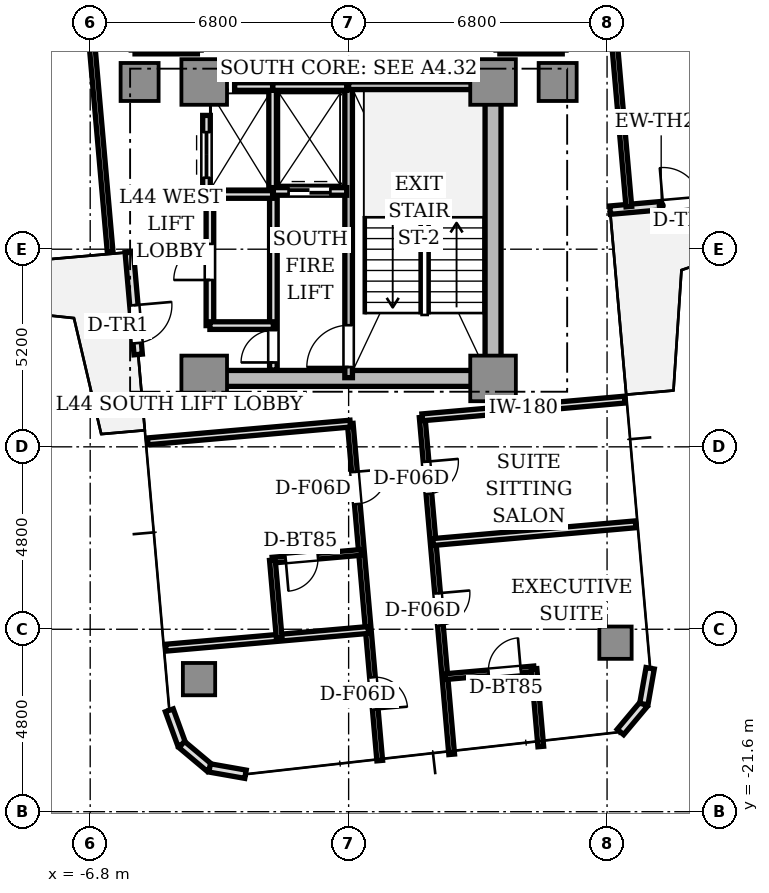
"""IFC4 building model, lengths in metres.
Left out: names, types, materials, properties, quantities, classifications, styles, units other than length and angle.
Written with IfcOpenShell. Run it as: python <this file> out.ifc"""

import sys

from ifc_helpers import new_model, si_unit, direction, frame, frame_2d, origin, origin_2d, place, context, subcontext, project, spatial, rectangle, extrude, source, transform, mapped, element, fill, save


model = new_model("IFC4")
c1 = context("Model", 3, precision=1e-05, world=origin(), true_north=direction((0.0, 1.0)))
c2 = subcontext(c1, "Body", "Model", "MODEL_VIEW")
j1 = project(units=[si_unit("LENGTHUNIT", "METRE"), si_unit("PLANEANGLEUNIT", "RADIAN")], contexts=[c1])
p1 = place(None, origin())
s1 = spatial("IfcSite", under=j1, at=p1, CompositionType="ELEMENT")
p2 = place(p1, origin())
s2 = spatial("IfcBuilding", under=s1, at=p2, CompositionType="ELEMENT")
p3 = place(p2, frame((0.0, 0.0, 160.65)))
s3 = spatial("IfcBuildingStorey", under=s2, at=p3, CompositionType="ELEMENT", Elevation=160.65)
p4 = place(p3, frame((-3.55, -10.2, 0.0), z_axis=(0.0, 0.0, 1.0), x_axis=(1.0, 0.0, 0.0)))
e1 = element("IfcWall", 1, at=p4, inside=s3, PredefinedType="SHEAR", context=c2, shape_type="SweptSolid", body=[
    extrude(rectangle(XDim=7.1, YDim=0.42, at=frame_2d((3.55, 0.0))), origin(), (0.0, 0.0, 1.0), 3.11),
])
p5 = place(p3, frame((3.8, -9.75, 0.0), z_axis=(0.0, 0.0, 1.0), x_axis=(0.0, 1.0, 0.0)))
e2 = element("IfcWall", 2, at=p5, inside=s3, PredefinedType="SHEAR", context=c2, shape_type="SweptSolid", body=[
    extrude(rectangle(XDim=6.9, YDim=0.42, at=frame_2d((3.45, 0.0))), origin(), (0.0, 0.0, 1.0), 3.11),
])
m1 = source(origin(), c2, "Body", "SweptSolid", [
    extrude(rectangle(XDim=1.2, YDim=1.2, at=origin_2d()), origin(), (0.0, 0.0, 1.0), 3.11),
])
for number, where, z_axis, x_axis in (
    (3, (-3.8, -2.4, 0.0), (0.0, 0.0, 1.0), (1.0, 0.0, 0.0)),
    (4, (3.8, -2.4, 0.0), (0.0, 0.0, 1.0), (1.0, 0.0, 0.0)),
    (5, (-3.8, -10.2, 0.0), (0.0, 0.0, 1.0), (1.0, 0.0, 0.0)),
    (6, (3.8, -10.2, 0.0), (0.0, 0.0, 1.0), (1.0, 0.0, 0.0)),
):
    element("IfcColumn", number, at=place(p3, frame(where, z_axis=z_axis, x_axis=x_axis)), inside=s3, PredefinedType="COLUMN", context=c2, shape_type="MappedRepresentation", body=[
        mapped(m1, transform((0.0, 0.0, 0.0), scale=1.0)),
    ])
m2 = source(origin(), c2, "Body", "SweptSolid", [
    extrude(rectangle(XDim=1.0, YDim=1.0, at=origin_2d()), origin(), (0.0, 0.0, 1.0), 3.11),
])
for number, where, z_axis, x_axis in (
    (7, (5.5, -2.4, 0.0), (0.0, 0.0, 1.0), (1.0, 0.0, 0.0)),
    (8, (-5.5, -2.4, 0.0), (0.0, 0.0, 1.0), (1.0, 0.0, 0.0)),
):
    element("IfcColumn", number, at=place(p3, frame(where, z_axis=z_axis, x_axis=x_axis)), inside=s3, PredefinedType="COLUMN", context=c2, shape_type="MappedRepresentation", body=[
        mapped(m2, transform((0.0, 0.0, 0.0), scale=1.0)),
    ])
m3 = source(origin(), c2, "Body", "SweptSolid", [
    extrude(rectangle(XDim=0.85, YDim=0.85, at=origin_2d()), origin(), (0.0, 0.0, 1.0), 3.11),
])
for number, where, z_axis, x_axis in (
    (9, (-3.936, -18.112, 0.0), (0.0, 0.0, 1.0), (1.0, 0.0, 0.0)),
    (10, (7.022, -17.153, 0.0), (0.0, 0.0, 1.0), (1.0, 0.0, 0.0)),
):
    element("IfcColumn", number, at=place(p3, frame(where, z_axis=z_axis, x_axis=x_axis)), inside=s3, PredefinedType="COLUMN", context=c2, shape_type="MappedRepresentation", body=[
        mapped(m3, transform((0.0, 0.0, 0.0), scale=1.0)),
    ])
p6 = place(p3, frame((6.879, -5.772, 0.0), z_axis=(0.0, 0.0, 1.0), x_axis=(0.996193619346, 0.087168071984, 0.0)))
e11 = element("IfcWall", 11, at=p6, inside=s3, PredefinedType="STANDARD", context=c2, shape_type="SweptSolid", body=[
    extrude(rectangle(XDim=2.7, YDim=0.22, at=frame_2d((1.35, 0.0))), origin(), (0.0, 0.0, 1.0), 3.11),
])
p7 = place(p6, frame((1.4, 0.0, 0.0)))
e12 = element("IfcOpeningElement", 12, at=p7, cuts=e11, PredefinedType="OPENING", context=c2, shape_type="SweptSolid", body=[
    extrude(rectangle(XDim=1.0, YDim=2.2, at=frame_2d((0.5, 1.1))), frame((0.0, 0.12, 0.0), z_axis=(0.0, -1.0, 0.0), x_axis=(1.0, 0.0, 0.0)), (0.0, 0.0, 1.0), 0.24),
])
p8 = place(p3, frame((-5.772, -6.879, 0.0), z_axis=(0.0, 0.0, 1.0), x_axis=(0.087168071984, -0.996193619346, 0.0)))
e13 = element("IfcWall", 13, at=p8, inside=s3, PredefinedType="STANDARD", context=c2, shape_type="SweptSolid", body=[
    extrude(rectangle(XDim=2.7, YDim=0.22, at=frame_2d((1.35, 0.0))), origin(), (0.0, 0.0, 1.0), 3.11),
])
p9 = place(p8, frame((1.4, 0.0, 0.0)))
e14 = element("IfcOpeningElement", 14, at=p9, cuts=e13, PredefinedType="OPENING", context=c2, shape_type="SweptSolid", body=[
    extrude(rectangle(XDim=1.0, YDim=2.2, at=frame_2d((0.5, 1.1))), frame((0.0, 0.12, 0.0), z_axis=(0.0, -1.0, 0.0), x_axis=(1.0, 0.0, 0.0)), (0.0, 0.0, 1.0), 0.24),
])
p10 = place(p3, frame((-4.718, -18.933, 0.0), z_axis=(0.0, 0.0, 1.0), x_axis=(0.34188635151, -0.939741306239, 0.0)))
e15 = element("IfcWall", 15, at=p10, inside=s3, PredefinedType="STANDARD", context=c2, shape_type="SweptSolid", body=[
    extrude(rectangle(XDim=0.958, YDim=0.22, at=frame_2d((0.479, 0.0))), origin(), (0.0, 0.0, 1.0), 3.11),
])
for number, where, z_axis, x_axis in (
    (16, (-4.39, -19.833, 0.0), (0.0, 0.0, 1.0), (0.766, -0.643, 0.0)),
    (17, (-3.657, -20.449, 0.0), (0.0, 0.0, 1.0), (0.985, -0.174, 0.0)),
):
    element("IfcWall", number, at=place(p3, frame(where, z_axis=z_axis, x_axis=x_axis)), inside=s3, PredefinedType="STANDARD", context=c2, shape_type="SweptSolid", body=[
        extrude(rectangle(XDim=0.958, YDim=0.22, at=frame_2d((0.479, 0.0))), origin(), (0.0, 0.0, 1.0), 3.11),
    ])
for number, where, z_axis, x_axis in (
    (18, (7.152, -19.503, 0.0), (0.0, 0.0, 1.0), (0.643, 0.766, 0.0)),
    (19, (7.768, -18.769, 0.0), (0.0, 0.0, 1.0), (0.174, 0.985, 0.0)),
):
    element("IfcWall", number, at=place(p3, frame(where, z_axis=z_axis, x_axis=x_axis)), inside=s3, PredefinedType="STANDARD", context=c2, shape_type="SweptSolid", body=[
        extrude(rectangle(XDim=0.958, YDim=0.22, at=frame_2d((0.479, 0.0))), origin(), (0.0, 0.0, 1.0), 3.11),
    ])
p11 = place(p3, frame((0.0, -10.18, 0.0), z_axis=(0.0, 0.0, 1.0), x_axis=(0.0, 1.0, 0.0)))
e20 = element("IfcWall", 20, at=p11, inside=s3, PredefinedType="SOLIDWALL", context=c2, shape_type="SweptSolid", body=[
    extrude(rectangle(XDim=7.68, YDim=0.2, at=frame_2d((3.84, 0.0))), origin(), (0.0, 0.0, 1.0), 3.11),
])
p12 = place(p11, frame((0.28, 0.0, 0.0)))
e21 = element("IfcOpeningElement", 21, at=p12, cuts=e20, PredefinedType="OPENING", context=c2, shape_type="SweptSolid", body=[
    extrude(rectangle(XDim=1.1, YDim=2.15, at=frame_2d((0.55, 1.075))), frame((0.0, 0.11, 0.0), z_axis=(0.0, -1.0, 0.0), x_axis=(1.0, 0.0, 0.0)), (0.0, 0.0, 1.0), 0.22),
])
p13 = place(p3, frame((0.0, -2.5, 0.0), z_axis=(0.0, 0.0, 1.0), x_axis=(1.0, 0.0, 0.0)))
e22 = element("IfcWall", 22, at=p13, inside=s3, PredefinedType="SOLIDWALL", context=c2, shape_type="SweptSolid", body=[
    extrude(rectangle(XDim=3.72, YDim=0.2, at=frame_2d((1.86, 0.0))), origin(), (0.0, 0.0, 1.0), 3.11),
])
p14 = place(p3, frame((-1.98, -9.98, 0.0), z_axis=(0.0, 0.0, 1.0), x_axis=(0.0, 1.0, 0.0)))
e23 = element("IfcWall", 23, at=p14, inside=s3, PredefinedType="SOLIDWALL", context=c2, shape_type="SweptSolid", body=[
    extrude(rectangle(XDim=4.66, YDim=0.2, at=frame_2d((2.33, 0.0))), origin(), (0.0, 0.0, 1.0), 2.66),
])
p15 = place(p14, frame((0.2, 0.0, 0.0)))
e24 = element("IfcOpeningElement", 24, at=p15, cuts=e23, PredefinedType="OPENING", context=c2, shape_type="SweptSolid", body=[
    extrude(rectangle(XDim=0.85, YDim=2.1, at=frame_2d((0.425, 1.05))), frame((0.0, 0.11, 0.0), z_axis=(0.0, -1.0, 0.0), x_axis=(1.0, 0.0, 0.0)), (0.0, 0.0, 1.0), 0.22),
])
p16 = place(p3, frame((-2.0, -5.28, 0.0), z_axis=(0.0, 0.0, 1.0), x_axis=(0.0, 1.0, 0.0)))
e25 = element("IfcWall", 25, at=p16, inside=s3, PredefinedType="SOLIDWALL", context=c2, shape_type="SweptSolid", body=[
    extrude(rectangle(XDim=2.78, YDim=0.2, at=frame_2d((1.39, 0.0))), origin(), (0.0, 0.0, 1.0), 2.66),
])
p17 = place(p3, frame((-2.0, -2.52, 0.0), z_axis=(0.0, 0.0, 1.0), x_axis=(1.0, 0.0, 0.0)))
e26 = element("IfcWall", 26, at=p17, inside=s3, PredefinedType="SOLIDWALL", context=c2, shape_type="SweptSolid", body=[
    extrude(rectangle(XDim=1.95, YDim=0.2, at=frame_2d((0.975, 0.0))), origin(), (0.0, 0.0, 1.0), 2.66),
])
p18 = place(p3, frame((-1.98, -5.28, 0.0), z_axis=(0.0, 0.0, 1.0), x_axis=(1.0, 0.0, 0.0)))
e27 = element("IfcWall", 27, at=p18, inside=s3, PredefinedType="SOLIDWALL", context=c2, shape_type="SweptSolid", body=[
    extrude(rectangle(XDim=1.93, YDim=0.2, at=frame_2d((0.965, 0.0))), origin(), (0.0, 0.0, 1.0), 2.66),
])
p19 = place(p18, frame((0.4, 0.0, 0.0)))
e28 = element("IfcOpeningElement", 28, at=p19, cuts=e27, PredefinedType="OPENING", context=c2, shape_type="SweptSolid", body=[
    extrude(rectangle(XDim=1.1, YDim=2.2, at=frame_2d((0.55, 1.1))), frame((0.0, 0.11, 0.0), z_axis=(0.0, -1.0, 0.0), x_axis=(1.0, 0.0, 0.0)), (0.0, 0.0, 1.0), 0.22),
])
p20 = place(p3, frame((-3.0, -2.52, 0.0), z_axis=(0.0, 0.0, 1.0), x_axis=(1.0, 0.0, 0.0)))
e29 = element("IfcWall", 29, at=p20, inside=s3, PredefinedType="SOLIDWALL", context=c2, shape_type="SweptSolid", body=[
    extrude(rectangle(XDim=1.0, YDim=0.2, at=frame_2d((0.5, 0.0))), origin(), (0.0, 0.0, 1.0), 2.66),
])
p21 = place(p3, frame((-3.74, -5.36, 0.0), z_axis=(0.0, 0.0, 1.0), x_axis=(1.0, 0.0, 0.0)))
e30 = element("IfcWall", 30, at=p21, inside=s3, PredefinedType="SOLIDWALL", context=c2, shape_type="SweptSolid", body=[
    extrude(rectangle(XDim=1.74, YDim=0.2, at=frame_2d((0.87, 0.0))), origin(), (0.0, 0.0, 1.0), 2.66),
])
p22 = place(p3, frame((-3.74, -5.36, 0.0), z_axis=(0.0, 0.0, 1.0), x_axis=(0.0, 1.0, 0.0)))
e31 = element("IfcWall", 31, at=p22, inside=s3, PredefinedType="SOLIDWALL", context=c2, shape_type="SweptSolid", body=[
    extrude(rectangle(XDim=2.08, YDim=0.2, at=frame_2d((1.04, 0.0))), origin(), (0.0, 0.0, 1.0), 2.66),
])
p23 = place(p22, frame((0.44, 0.0, 0.0)))
e32 = element("IfcOpeningElement", 32, at=p23, cuts=e31, PredefinedType="OPENING", context=c2, shape_type="SweptSolid", body=[
    extrude(rectangle(XDim=1.2, YDim=2.2, at=frame_2d((0.6, 1.1))), frame((0.0, 0.11, 0.0), z_axis=(0.0, -1.0, 0.0), x_axis=(1.0, 0.0, 0.0)), (0.0, 0.0, 1.0), 0.22),
])
for number, where, z_axis, x_axis in (
    (33, (3.98, -1.56, 0.0), (0.0, 0.0, 1.0), (1.0, 0.0, 0.0)),
    (34, (-5.62, -1.56, 0.0), (0.0, 0.0, 1.0), (1.0, 0.0, 0.0)),
):
    element("IfcWall", number, at=place(p3, frame(where, z_axis=z_axis, x_axis=x_axis)), inside=s3, PredefinedType="SOLIDWALL", context=c2, shape_type="SweptSolid", body=[
        extrude(rectangle(XDim=1.64, YDim=0.2, at=frame_2d((0.82, 0.0))), origin(), (0.0, 0.0, 1.0), 2.66),
    ])
p24 = place(p3, frame((-3.65, -8.81, 0.0), z_axis=(0.0, 0.0, 1.0), x_axis=(0.0, 1.0, 0.0)))
e35 = element("IfcWall", 35, at=p24, inside=s3, PredefinedType="SOLIDWALL", context=c2, shape_type="SweptSolid", body=[
    extrude(rectangle(XDim=3.43, YDim=0.2, at=frame_2d((1.715, 0.0))), origin(), (0.0, 0.0, 1.0), 2.66),
])
p25 = place(p24, frame((1.2, 0.0, 0.0)))
e36 = element("IfcOpeningElement", 36, at=p25, cuts=e35, PredefinedType="OPENING", context=c2, shape_type="SweptSolid", body=[
    extrude(rectangle(XDim=0.95, YDim=2.15, at=frame_2d((0.475, 1.075))), frame((0.0, 0.11, 0.0), z_axis=(0.0, -1.0, 0.0), x_axis=(1.0, 0.0, 0.0)), (0.0, 0.0, 1.0), 0.22),
])
p26 = place(p3, frame((-3.65, -8.81, 0.0), z_axis=(0.0, 0.0, 1.0), x_axis=(1.0, 0.0, 0.0)))
e37 = element("IfcWall", 37, at=p26, inside=s3, PredefinedType="SOLIDWALL", context=c2, shape_type="SweptSolid", body=[
    extrude(rectangle(XDim=1.67, YDim=0.2, at=frame_2d((0.835, 0.0))), origin(), (0.0, 0.0, 1.0), 2.66),
])
p27 = place(p3, frame((7.373, -5.679, 0.0), z_axis=(0.0, 0.0, 1.0), x_axis=(-0.087154691724, 0.996194790044, 0.0)))
e38 = element("IfcWall", 38, at=p27, inside=s3, PredefinedType="PARTITIONING", context=c2, shape_type="SweptSolid", body=[
    extrude(rectangle(XDim=12.6, YDim=0.15, at=frame_2d((6.3, 0.0))), origin(), (0.0, 0.0, 1.0), 2.66),
])
p28 = place(p27, frame((5.5, 0.0, 0.0)))
e39 = element("IfcOpeningElement", 39, at=p28, cuts=e38, PredefinedType="OPENING", context=c2, shape_type="SweptSolid", body=[
    extrude(rectangle(XDim=1.6, YDim=2.25, at=frame_2d((0.8, 1.125))), frame((0.0, 0.085, 0.0), z_axis=(0.0, -1.0, 0.0), x_axis=(1.0, 0.0, 0.0)), (0.0, 0.0, 1.0), 0.17),
])
p29 = place(p3, frame((-7.373, 5.679, 0.0), z_axis=(0.0, 0.0, 1.0), x_axis=(0.087154691724, -0.996194790044, 0.0)))
e40 = element("IfcWall", 40, at=p29, inside=s3, PredefinedType="PARTITIONING", context=c2, shape_type="SweptSolid", body=[
    extrude(rectangle(XDim=12.6, YDim=0.15, at=frame_2d((6.3, 0.0))), origin(), (0.0, 0.0, 1.0), 2.66),
])
p30 = place(p29, frame((5.5, 0.0, 0.0)))
e41 = element("IfcOpeningElement", 41, at=p30, cuts=e40, PredefinedType="OPENING", context=c2, shape_type="SweptSolid", body=[
    extrude(rectangle(XDim=1.6, YDim=2.25, at=frame_2d((0.8, 1.125))), frame((0.0, 0.085, 0.0), z_axis=(0.0, -1.0, 0.0), x_axis=(1.0, 0.0, 0.0)), (0.0, 0.0, 1.0), 0.17),
])
p31 = place(p3, frame((1.936, -11.224, 0.0), z_axis=(0.0, 0.0, 1.0), x_axis=(0.087151636982, -0.996195057291, 0.0)))
e42 = element("IfcWall", 42, at=p31, inside=s3, PredefinedType="PARTITIONING", context=c2, shape_type="SweptSolid", body=[
    extrude(rectangle(XDim=8.9, YDim=0.15, at=frame_2d((4.45, 0.0))), origin(), (0.0, 0.0, 1.0), 2.66),
])
p32 = place(p31, frame((1.172, 0.0, 0.0)))
e43 = element("IfcOpeningElement", 43, at=p32, cuts=e42, PredefinedType="OPENING", context=c2, shape_type="SweptSolid", body=[
    extrude(rectangle(XDim=0.85, YDim=2.1, at=frame_2d((0.425, 1.05))), frame((0.0, 0.085, 0.0), z_axis=(0.0, -1.0, 0.0), x_axis=(1.0, 0.0, 0.0)), (0.0, 0.0, 1.0), 0.17),
])
p33 = place(p31, frame((4.647, 0.0, 0.0)))
e44 = element("IfcOpeningElement", 44, at=p33, cuts=e42, PredefinedType="OPENING", context=c2, shape_type="SweptSolid", body=[
    extrude(rectangle(XDim=0.85, YDim=2.1, at=frame_2d((0.425, 1.05))), frame((0.0, 0.085, 0.0), z_axis=(0.0, -1.0, 0.0), x_axis=(1.0, 0.0, 0.0)), (0.0, 0.0, 1.0), 0.17),
])
p34 = place(p3, frame((0.043, -11.39, 0.0), z_axis=(0.0, 0.0, 1.0), x_axis=(0.087178860582, -0.996192675273, 0.0)))
e45 = element("IfcWall", 45, at=p34, inside=s3, PredefinedType="PARTITIONING", context=c2, shape_type="SweptSolid", body=[
    extrude(rectangle(XDim=8.9, YDim=0.15, at=frame_2d((4.45, 0.0))), origin(), (0.0, 0.0, 1.0), 2.66),
])
p35 = place(p34, frame((1.275, 0.0, 0.0)))
e46 = element("IfcOpeningElement", 46, at=p35, cuts=e45, PredefinedType="OPENING", context=c2, shape_type="SweptSolid", body=[
    extrude(rectangle(XDim=0.85, YDim=2.1, at=frame_2d((0.425, 1.05))), frame((0.0, 0.085, 0.0), z_axis=(0.0, -1.0, 0.0), x_axis=(1.0, 0.0, 0.0)), (0.0, 0.0, 1.0), 0.17),
])
p36 = place(p34, frame((6.7, 0.0, 0.0)))
e47 = element("IfcOpeningElement", 47, at=p36, cuts=e45, PredefinedType="OPENING", context=c2, shape_type="SweptSolid", body=[
    extrude(rectangle(XDim=0.85, YDim=2.1, at=frame_2d((0.425, 1.05))), frame((0.0, 0.085, 0.0), z_axis=(0.0, -1.0, 0.0), x_axis=(1.0, 0.0, 0.0)), (0.0, 0.0, 1.0), 0.17),
])
for number, where, z_axis, x_axis in (
    (48, (1.936, -11.224, 0.0), (0.0, 0.0, 1.0), (0.996, 0.087, 0.0)),
    (49, (-5.287, -11.856, 0.0), (0.0, 0.0, 1.0), (0.996, 0.087, 0.0)),
    (50, (2.223, -14.504, 0.0), (0.0, 0.0, 1.0), (0.996, 0.087, 0.0)),
):
    element("IfcWall", number, at=place(p3, frame(where, z_axis=z_axis, x_axis=x_axis)), inside=s3, PredefinedType="PARTITIONING", context=c2, shape_type="SweptSolid", body=[
        extrude(rectangle(XDim=5.35, YDim=0.18, at=frame_2d((2.675, 0.0))), origin(), (0.0, 0.0, 1.0), 2.66),
    ])
p37 = place(p3, frame((2.533, -18.048, 0.0), z_axis=(0.0, 0.0, 1.0), x_axis=(0.996197656711, 0.087121918963, 0.0)))
e51 = element("IfcWall", 51, at=p37, inside=s3, PredefinedType="PARTITIONING", context=c2, shape_type="SweptSolid", body=[
    extrude(rectangle(XDim=2.354, YDim=0.15, at=frame_2d((1.177, 0.0))), origin(), (0.0, 0.0, 1.0), 2.66),
])
p38 = place(p37, frame((1.154, 0.0, 0.0)))
e52 = element("IfcOpeningElement", 52, at=p38, cuts=e51, PredefinedType="OPENING", context=c2, shape_type="SweptSolid", body=[
    extrude(rectangle(XDim=0.85, YDim=2.1, at=frame_2d((0.425, 1.05))), frame((0.0, 0.085, 0.0), z_axis=(0.0, -1.0, 0.0), x_axis=(1.0, 0.0, 0.0)), (0.0, 0.0, 1.0), 0.17),
])
p39 = place(p3, frame((4.878, -17.843, 0.0), z_axis=(0.0, 0.0, 1.0), x_axis=(0.087174336889, -0.99619307114, 0.0)))
e53 = element("IfcWall", 53, at=p39, inside=s3, PredefinedType="PARTITIONING", context=c2, shape_type="SweptSolid", body=[
    extrude(rectangle(XDim=2.05, YDim=0.15, at=frame_2d((1.025, 0.0))), origin(), (0.0, 0.0, 1.0), 2.66),
])
p40 = place(p3, frame((0.518, -16.819, 0.0), z_axis=(0.0, 0.0, 1.0), x_axis=(-0.996194212812, -0.087161289348, 0.0)))
e54 = element("IfcWall", 54, at=p40, inside=s3, PredefinedType="PARTITIONING", context=c2, shape_type="SweptSolid", body=[
    extrude(rectangle(XDim=5.35, YDim=0.18, at=frame_2d((2.675, 0.0))), origin(), (0.0, 0.0, 1.0), 2.66),
])
p41 = place(p3, frame((0.339, -14.777, 0.0), z_axis=(0.0, 0.0, 1.0), x_axis=(-0.996197656711, -0.087121918963, 0.0)))
e55 = element("IfcWall", 55, at=p41, inside=s3, PredefinedType="PARTITIONING", context=c2, shape_type="SweptSolid", body=[
    extrude(rectangle(XDim=2.354, YDim=0.15, at=frame_2d((1.177, 0.0))), origin(), (0.0, 0.0, 1.0), 2.66),
])
p42 = place(p41, frame((1.154, 0.0, 0.0)))
e56 = element("IfcOpeningElement", 56, at=p42, cuts=e55, PredefinedType="OPENING", context=c2, shape_type="SweptSolid", body=[
    extrude(rectangle(XDim=0.85, YDim=2.1, at=frame_2d((0.425, 1.05))), frame((0.0, 0.085, 0.0), z_axis=(0.0, -1.0, 0.0), x_axis=(1.0, 0.0, 0.0)), (0.0, 0.0, 1.0), 0.17),
])
p43 = place(p3, frame((-2.006, -14.982, 0.0), z_axis=(0.0, 0.0, 1.0), x_axis=(0.087174336889, -0.99619307114, 0.0)))
e57 = element("IfcWall", 57, at=p43, inside=s3, PredefinedType="PARTITIONING", context=c2, shape_type="SweptSolid", body=[
    extrude(rectangle(XDim=2.05, YDim=0.15, at=frame_2d((1.025, 0.0))), origin(), (0.0, 0.0, 1.0), 2.66),
])
m4 = source(origin(), c2, "Body", "SweptSolid", [
    extrude(rectangle(XDim=1.0, YDim=0.05, at=origin_2d()), origin(), (0.0, 0.0, 1.0), 2.2),
])
p44 = place(p7, frame((0.5, 0.0, 0.0)))
e58 = element("IfcDoor", 58, at=p44, inside=s3, OperationType="SINGLE_SWING_LEFT", PredefinedType="DOOR", context=c2, shape_type="MappedRepresentation", body=[
    mapped(m4, transform((0.0, 0.0, 0.0), scale=1.0)),
])
fill(e12, e58)
p45 = place(p9, frame((0.5, 0.0, 0.0)))
e59 = element("IfcDoor", 59, at=p45, inside=s3, OperationType="SINGLE_SWING_LEFT", PredefinedType="DOOR", context=c2, shape_type="MappedRepresentation", body=[
    mapped(m4, transform((0.0, 0.0, 0.0), scale=1.0)),
])
fill(e14, e59)
m5 = source(origin(), c2, "Body", "SweptSolid", [
    extrude(rectangle(XDim=1.1, YDim=0.05, at=origin_2d()), origin(), (0.0, 0.0, 1.0), 2.15),
])
p46 = place(p12, frame((0.55, 0.0, 0.0)))
e60 = element("IfcDoor", 60, at=p46, inside=s3, OperationType="SINGLE_SWING_LEFT", PredefinedType="DOOR", context=c2, shape_type="MappedRepresentation", body=[
    mapped(m5, transform((0.0, 0.0, 0.0), scale=1.0)),
])
fill(e21, e60)
m6 = source(origin(), c2, "Body", "SweptSolid", [
    extrude(rectangle(XDim=0.85, YDim=0.05, at=origin_2d()), origin(), (0.0, 0.0, 1.0), 2.1),
])
p47 = place(p15, frame((0.425, 0.0, 0.0)))
e61 = element("IfcDoor", 61, at=p47, inside=s3, OperationType="SINGLE_SWING_LEFT", PredefinedType="DOOR", context=c2, shape_type="MappedRepresentation", body=[
    mapped(m6, transform((0.0, 0.0, 0.0), scale=1.0)),
])
fill(e24, e61)
m7 = source(origin(), c2, "Body", "SweptSolid", [
    extrude(rectangle(XDim=1.1, YDim=0.05, at=origin_2d()), origin(), (0.0, 0.0, 1.0), 2.2),
])
p48 = place(p19, frame((0.55, 0.0, 0.0)))
e62 = element("IfcDoor", 62, at=p48, inside=s3, OperationType="DOUBLE_DOOR_SLIDING", PredefinedType="DOOR", context=c2, shape_type="MappedRepresentation", body=[
    mapped(m7, transform((0.0, 0.0, 0.0), scale=1.0)),
])
fill(e28, e62)
m8 = source(origin(), c2, "Body", "SweptSolid", [
    extrude(rectangle(XDim=1.2, YDim=0.05, at=origin_2d()), origin(), (0.0, 0.0, 1.0), 2.2),
])
p49 = place(p23, frame((0.6, 0.0, 0.0)))
e63 = element("IfcDoor", 63, at=p49, inside=s3, OperationType="DOUBLE_DOOR_SLIDING", PredefinedType="DOOR", context=c2, shape_type="MappedRepresentation", body=[
    mapped(m8, transform((0.0, 0.0, 0.0), scale=1.0)),
])
fill(e32, e63)
m9 = source(origin(), c2, "Body", "SweptSolid", [
    extrude(rectangle(XDim=0.95, YDim=0.05, at=origin_2d()), origin(), (0.0, 0.0, 1.0), 2.15),
])
p50 = place(p25, frame((0.475, 0.0, 0.0)))
e64 = element("IfcDoor", 64, at=p50, inside=s3, OperationType="SINGLE_SWING_LEFT", PredefinedType="DOOR", context=c2, shape_type="MappedRepresentation", body=[
    mapped(m9, transform((0.0, 0.0, 0.0), scale=1.0)),
])
fill(e36, e64)
p51 = place(p32, frame((0.425, 0.0, 0.0)))
e65 = element("IfcDoor", 65, at=p51, inside=s3, OperationType="SINGLE_SWING_LEFT", PredefinedType="DOOR", context=c2, shape_type="MappedRepresentation", body=[
    mapped(m6, transform((0.0, 0.0, 0.0), scale=1.0)),
])
fill(e43, e65)
p52 = place(p38, frame((0.425, 0.0, 0.0)))
e66 = element("IfcDoor", 66, at=p52, inside=s3, OperationType="SINGLE_SWING_RIGHT", PredefinedType="DOOR", context=c2, shape_type="MappedRepresentation", body=[
    mapped(m6, transform((0.0, 0.0, 0.0), scale=1.0)),
])
fill(e52, e66)
p53 = place(p33, frame((0.425, 0.0, 0.0)))
e67 = element("IfcDoor", 67, at=p53, inside=s3, OperationType="SINGLE_SWING_LEFT", PredefinedType="DOOR", context=c2, shape_type="MappedRepresentation", body=[
    mapped(m6, transform((0.0, 0.0, 0.0), scale=1.0)),
])
fill(e44, e67)
p54 = place(p42, frame((0.425, 0.0, 0.0)))
e68 = element("IfcDoor", 68, at=p54, inside=s3, OperationType="SINGLE_SWING_RIGHT", PredefinedType="DOOR", context=c2, shape_type="MappedRepresentation", body=[
    mapped(m6, transform((0.0, 0.0, 0.0), scale=1.0)),
])
fill(e56, e68)
p55 = place(p35, frame((0.425, 0.0, 0.0)))
e69 = element("IfcDoor", 69, at=p55, inside=s3, OperationType="SINGLE_SWING_LEFT", PredefinedType="DOOR", context=c2, shape_type="MappedRepresentation", body=[
    mapped(m6, transform((0.0, 0.0, 0.0), scale=1.0)),
])
fill(e46, e69)
p56 = place(p36, frame((0.425, 0.0, 0.0)))
e70 = element("IfcDoor", 70, at=p56, inside=s3, OperationType="SINGLE_SWING_RIGHT", PredefinedType="DOOR", context=c2, shape_type="MappedRepresentation", body=[
    mapped(m6, transform((0.0, 0.0, 0.0), scale=1.0)),
])
fill(e47, e70)
save(model, sys.argv[1])
